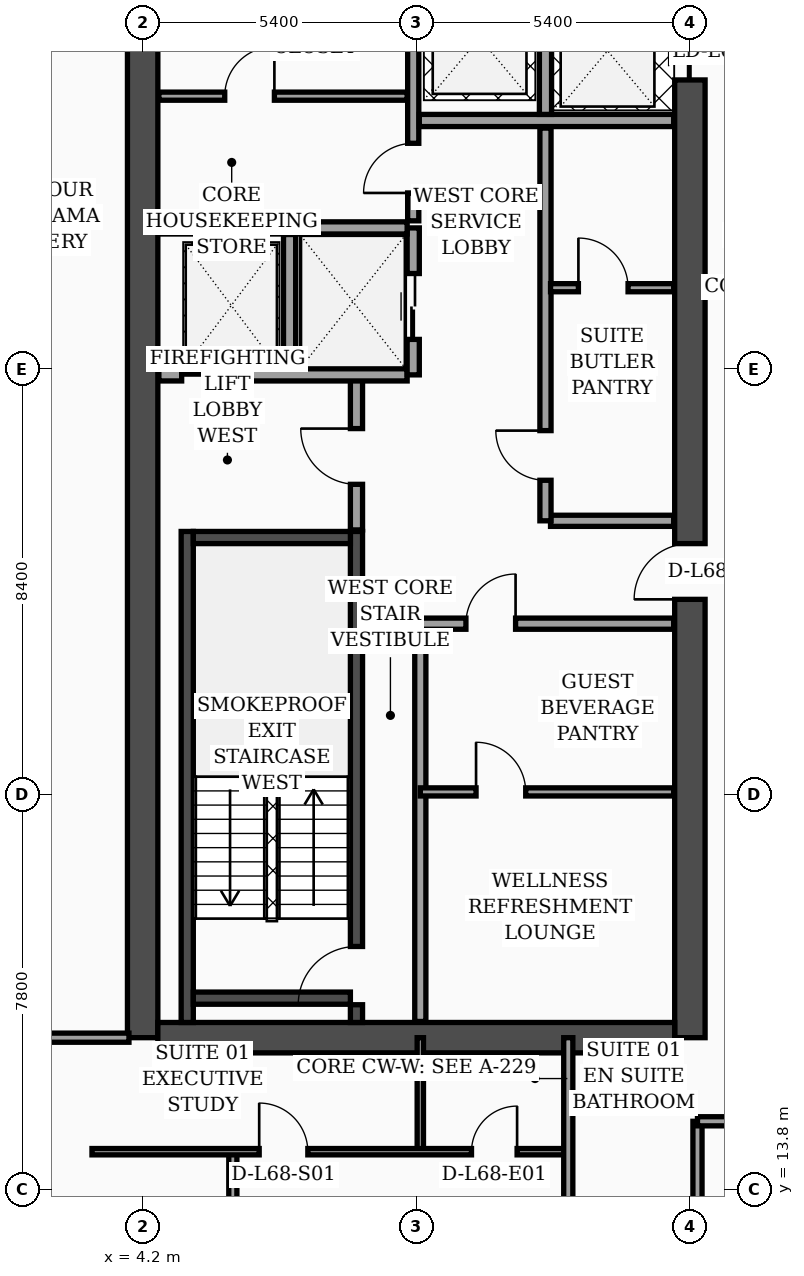
"""IFC4 building model, lengths in metres.
Left out: names, types, materials, properties, quantities, classifications, styles, units other than length and angle.
Written with IfcOpenShell. Run it as: python <this file> out.ifc"""

import sys

from ifc_helpers import new_model, si_unit, direction, frame, frame_2d, origin, place, context, subcontext, project, spatial, rectangle, extrude, element, fill, save


model = new_model("IFC4")
c1 = context("Model", 3, precision=1e-05, world=origin(), true_north=direction((0.0, 1.0)))
c2 = subcontext(c1, "Body", "Model", "MODEL_VIEW")
j1 = project(units=[si_unit("LENGTHUNIT", "METRE"), si_unit("PLANEANGLEUNIT", "RADIAN")], contexts=[c1])
p1 = place(None, origin())
s1 = spatial("IfcSite", under=j1, at=p1, CompositionType="ELEMENT")
p2 = place(p1, origin())
s2 = spatial("IfcBuilding", under=s1, at=p2, CompositionType="ELEMENT")
p3 = place(p2, frame((0.0, 0.0, 274.9)))
s3 = spatial("IfcBuildingStorey", under=s2, at=p3, CompositionType="ELEMENT", Elevation=274.9)
p4 = place(p3, frame((4.2, 16.8, 0.0), z_axis=(0.0, 0.0, 1.0), x_axis=(0.0, 1.0, 0.0)))
e1 = element("IfcWall", 1, at=p4, inside=s3, PredefinedType="SHEAR", context=c2, shape_type="SweptSolid", body=[
    extrude(rectangle(XDim=21.6, YDim=0.6, at=frame_2d((10.8, 0.0))), origin(), (0.0, 0.0, 1.0), 3.56),
])
p5 = place(p3, frame((15.0, 16.8, 0.0), z_axis=(0.0, 0.0, 1.0), x_axis=(0.0, 1.0, 0.0)))
e2 = element("IfcWall", 2, at=p5, inside=s3, PredefinedType="SHEAR", context=c2, shape_type="SweptSolid", body=[
    extrude(rectangle(XDim=21.6, YDim=0.6, at=frame_2d((10.8, 0.0))), origin(), (0.0, 0.0, 1.0), 3.56),
])
p6 = place(p5, frame((8.65, 0.0, 0.0)))
e3 = element("IfcOpeningElement", 3, at=p6, cuts=e2, PredefinedType="OPENING", context=c2, shape_type="SweptSolid", body=[
    extrude(rectangle(XDim=1.1, YDim=2.2, at=frame_2d((0.55, 1.1))), frame((0.0, 0.31, 0.0), z_axis=(0.0, -1.0, 0.0), x_axis=(1.0, 0.0, 0.0)), (0.0, 0.0, 1.0), 0.62),
])
p7 = place(p5, frame((18.9, 0.0, 0.0)))
e4 = element("IfcOpeningElement", 4, at=p7, cuts=e2, PredefinedType="OPENING", context=c2, shape_type="SweptSolid", body=[
    extrude(rectangle(XDim=1.1, YDim=2.2, at=frame_2d((0.55, 1.1))), frame((0.0, 0.31, 0.0), z_axis=(0.0, -1.0, 0.0), x_axis=(1.0, 0.0, 0.0)), (0.0, 0.0, 1.0), 0.62),
])
p8 = place(p3, frame((4.5, 16.8, 0.0), z_axis=(0.0, 0.0, 1.0), x_axis=(1.0, 0.0, 0.0)))
e5 = element("IfcWall", 5, at=p8, inside=s3, PredefinedType="SHEAR", context=c2, shape_type="SweptSolid", body=[
    extrude(rectangle(XDim=10.2, YDim=0.6, at=frame_2d((5.1, 0.0))), origin(), (0.0, 0.0, 1.0), 3.56),
])
p9 = place(p3, frame((5.08, 17.1, 0.0), z_axis=(0.0, 0.0, 1.0), x_axis=(0.0, 1.0, 0.0)))
e6 = element("IfcWall", 6, at=p9, inside=s3, PredefinedType="SOLIDWALL", context=c2, shape_type="SweptSolid", body=[
    extrude(rectangle(XDim=9.69, YDim=0.24, at=frame_2d((4.845, 0.0))), origin(), (0.0, 0.0, 1.0), 3.56),
])
p10 = place(p3, frame((8.42, 17.1, 0.0), z_axis=(0.0, 0.0, 1.0), x_axis=(0.0, 1.0, 0.0)))
e7 = element("IfcWall", 7, at=p10, inside=s3, PredefinedType="SOLIDWALL", context=c2, shape_type="SweptSolid", body=[
    extrude(rectangle(XDim=9.69, YDim=0.24, at=frame_2d((4.845, 0.0))), origin(), (0.0, 0.0, 1.0), 3.56),
])
p11 = place(p10, frame((0.35, 0.0, 0.0)))
e8 = element("IfcOpeningElement", 8, at=p11, cuts=e7, PredefinedType="OPENING", context=c2, shape_type="SweptSolid", body=[
    extrude(rectangle(XDim=1.15, YDim=2.2, at=frame_2d((0.575, 1.1))), frame((0.0, 0.13, 0.0), z_axis=(0.0, -1.0, 0.0), x_axis=(1.0, 0.0, 0.0)), (0.0, 0.0, 1.0), 0.26),
])
for number, where, z_axis, x_axis in (
    (9, (5.2, 17.58, 0.0), (0.0, 0.0, 1.0), (1.0, 0.0, 0.0)),
    (10, (5.2, 26.67, 0.0), (0.0, 0.0, 1.0), (1.0, 0.0, 0.0)),
):
    element("IfcWall", number, at=place(p3, frame(where, z_axis=z_axis, x_axis=x_axis)), inside=s3, PredefinedType="SOLIDWALL", context=c2, shape_type="SweptSolid", body=[
        extrude(rectangle(XDim=3.1, YDim=0.24, at=frame_2d((1.55, 0.0))), origin(), (0.0, 0.0, 1.0), 3.56),
    ])
p12 = place(p3, frame((8.42, 26.82, 0.0), z_axis=(0.0, 0.0, 1.0), x_axis=(0.0, 1.0, 0.0)))
e11 = element("IfcWall", 11, at=p12, inside=s3, PredefinedType="SOLIDWALL", context=c2, shape_type="SweptSolid", body=[
    extrude(rectangle(XDim=3.0, YDim=0.24, at=frame_2d((1.5, 0.0))), origin(), (0.0, 0.0, 1.0), 3.56),
])
p13 = place(p12, frame((0.9, 0.0, 0.0)))
e12 = element("IfcOpeningElement", 12, at=p13, cuts=e11, PredefinedType="OPENING", context=c2, shape_type="SweptSolid", body=[
    extrude(rectangle(XDim=1.1, YDim=2.2, at=frame_2d((0.55, 1.1))), frame((0.0, 0.13, 0.0), z_axis=(0.0, -1.0, 0.0), x_axis=(1.0, 0.0, 0.0)), (0.0, 0.0, 1.0), 0.26),
])
p14 = place(p3, frame((4.52, 29.88, 0.0), z_axis=(0.0, 0.0, 1.0), x_axis=(1.0, 0.0, 0.0)))
e13 = element("IfcWall", 13, at=p14, inside=s3, PredefinedType="SOLIDWALL", context=c2, shape_type="SweptSolid", body=[
    extrude(rectangle(XDim=4.9, YDim=0.24, at=frame_2d((2.45, 0.0))), origin(), (0.0, 0.0, 1.0), 3.56),
])
p15 = place(p14, frame((0.45, 0.0, 0.0)))
e14 = element("IfcOpeningElement", 14, at=p15, cuts=e13, PredefinedType="OPENING", context=c2, shape_type="SweptSolid", body=[
    extrude(rectangle(XDim=1.3, YDim=2.35, at=frame_2d((0.65, 1.175))), frame((0.0, 0.13, 0.0), z_axis=(0.0, -1.0, 0.0), x_axis=(1.0, 0.0, 0.0)), (0.0, 0.0, 1.0), 0.26),
])
p16 = place(p3, frame((7.1, 30.02, 0.0), z_axis=(0.0, 0.0, 1.0), x_axis=(0.0, 1.0, 0.0)))
e15 = element("IfcWall", 15, at=p16, inside=s3, PredefinedType="SOLIDWALL", context=c2, shape_type="SweptSolid", body=[
    extrude(rectangle(XDim=2.63, YDim=0.24, at=frame_2d((1.315, 0.0))), origin(), (0.0, 0.0, 1.0), 3.56),
])
p17 = place(p3, frame((9.54, 29.88, 0.0), z_axis=(0.0, 0.0, 1.0), x_axis=(0.0, 1.0, 0.0)))
e16 = element("IfcWall", 16, at=p17, inside=s3, PredefinedType="SOLIDWALL", context=c2, shape_type="SweptSolid", body=[
    extrude(rectangle(XDim=2.9, YDim=0.24, at=frame_2d((1.45, 0.0))), origin(), (0.0, 0.0, 1.0), 3.56),
])
p18 = place(p17, frame((0.7, 0.0, 0.0)))
e17 = element("IfcOpeningElement", 17, at=p18, cuts=e16, PredefinedType="OPENING", context=c2, shape_type="SweptSolid", body=[
    extrude(rectangle(XDim=1.3, YDim=2.35, at=frame_2d((0.65, 1.175))), frame((0.0, 0.13, 0.0), z_axis=(0.0, -1.0, 0.0), x_axis=(1.0, 0.0, 0.0)), (0.0, 0.0, 1.0), 0.26),
])
p19 = place(p3, frame((4.52, 32.78, 0.0), z_axis=(0.0, 0.0, 1.0), x_axis=(1.0, 0.0, 0.0)))
e18 = element("IfcWall", 18, at=p19, inside=s3, PredefinedType="SOLIDWALL", context=c2, shape_type="SweptSolid", body=[
    extrude(rectangle(XDim=4.9, YDim=0.24, at=frame_2d((2.45, 0.0))), origin(), (0.0, 0.0, 1.0), 3.19),
])
p20 = place(p3, frame((9.68, 17.12, 0.0), z_axis=(0.0, 0.0, 1.0), x_axis=(0.0, 1.0, 0.0)))
e19 = element("IfcWall", 19, at=p20, inside=s3, PredefinedType="SOLIDWALL", context=c2, shape_type="SweptSolid", body=[
    extrude(rectangle(XDim=7.88, YDim=0.22, at=frame_2d((3.94, 0.0))), origin(), (0.0, 0.0, 1.0), 3.56),
])
p21 = place(p3, frame((4.52, 35.38, 0.0), z_axis=(0.0, 0.0, 1.0), x_axis=(1.0, 0.0, 0.0)))
e20 = element("IfcWall", 20, at=p21, inside=s3, PredefinedType="PARTITIONING", context=c2, shape_type="SweptSolid", body=[
    extrude(rectangle(XDim=4.9, YDim=0.16, at=frame_2d((2.45, 0.0))), origin(), (0.0, 0.0, 1.0), 3.56),
])
p22 = place(p21, frame((1.3, 0.0, 0.0)))
e21 = element("IfcOpeningElement", 21, at=p22, cuts=e20, PredefinedType="OPENING", context=c2, shape_type="SweptSolid", body=[
    extrude(rectangle(XDim=0.98, YDim=2.15, at=frame_2d((0.49, 1.075))), frame((0.0, 0.09, 0.0), z_axis=(0.0, -1.0, 0.0), x_axis=(1.0, 0.0, 0.0)), (0.0, 0.0, 1.0), 0.18),
])
p23 = place(p3, frame((9.54, 32.92, 0.0), z_axis=(0.0, 0.0, 1.0), x_axis=(0.0, 1.0, 0.0)))
e22 = element("IfcWall", 22, at=p23, inside=s3, PredefinedType="SOLIDWALL", context=c2, shape_type="SweptSolid", body=[
    extrude(rectangle(XDim=5.16, YDim=0.22, at=frame_2d((2.58, 0.0))), origin(), (0.0, 0.0, 1.0), 3.56),
])
p24 = place(p23, frame((0.55, 0.0, 0.0)))
e23 = element("IfcOpeningElement", 23, at=p24, cuts=e22, PredefinedType="OPENING", context=c2, shape_type="SweptSolid", body=[
    extrude(rectangle(XDim=0.98, YDim=2.15, at=frame_2d((0.49, 1.075))), frame((0.0, 0.12, 0.0), z_axis=(0.0, -1.0, 0.0), x_axis=(1.0, 0.0, 0.0)), (0.0, 0.0, 1.0), 0.24),
])
p25 = place(p3, frame((9.68, 21.65, 0.0), z_axis=(0.0, 0.0, 1.0), x_axis=(1.0, 0.0, 0.0)))
e24 = element("IfcWall", 24, at=p25, inside=s3, PredefinedType="PARTITIONING", context=c2, shape_type="SweptSolid", body=[
    extrude(rectangle(XDim=5.0, YDim=0.16, at=frame_2d((2.5, 0.0))), origin(), (0.0, 0.0, 1.0), 3.09),
])
p26 = place(p25, frame((1.1, 0.0, 0.0)))
e25 = element("IfcOpeningElement", 25, at=p26, cuts=e24, PredefinedType="OPENING", context=c2, shape_type="SweptSolid", body=[
    extrude(rectangle(XDim=0.98, YDim=2.15, at=frame_2d((0.49, 1.075))), frame((0.0, 0.09, 0.0), z_axis=(0.0, -1.0, 0.0), x_axis=(1.0, 0.0, 0.0)), (0.0, 0.0, 1.0), 0.18),
])
p27 = place(p3, frame((9.68, 24.97, 0.0), z_axis=(0.0, 0.0, 1.0), x_axis=(1.0, 0.0, 0.0)))
e26 = element("IfcWall", 26, at=p27, inside=s3, PredefinedType="SOLIDWALL", context=c2, shape_type="SweptSolid", body=[
    extrude(rectangle(XDim=5.0, YDim=0.22, at=frame_2d((2.5, 0.0))), origin(), (0.0, 0.0, 1.0), 2.99),
])
p28 = place(p27, frame((0.9, 0.0, 0.0)))
e27 = element("IfcOpeningElement", 27, at=p28, cuts=e26, PredefinedType="OPENING", context=c2, shape_type="SweptSolid", body=[
    extrude(rectangle(XDim=0.98, YDim=2.15, at=frame_2d((0.49, 1.075))), frame((0.0, 0.12, 0.0), z_axis=(0.0, -1.0, 0.0), x_axis=(1.0, 0.0, 0.0)), (0.0, 0.0, 1.0), 0.24),
])
p29 = place(p3, frame((12.25, 27.0, 0.0), z_axis=(0.0, 0.0, 1.0), x_axis=(1.0, 0.0, 0.0)))
e28 = element("IfcWall", 28, at=p29, inside=s3, PredefinedType="SOLIDWALL", context=c2, shape_type="SweptSolid", body=[
    extrude(rectangle(XDim=2.43, YDim=0.22, at=frame_2d((1.215, 0.0))), origin(), (0.0, 0.0, 1.0), 3.56),
])
p30 = place(p3, frame((12.15, 27.0, 0.0), z_axis=(0.0, 0.0, 1.0), x_axis=(0.0, 1.0, 0.0)))
e29 = element("IfcWall", 29, at=p30, inside=s3, PredefinedType="SOLIDWALL", context=c2, shape_type="SweptSolid", body=[
    extrude(rectangle(XDim=7.75, YDim=0.22, at=frame_2d((3.875, 0.0))), origin(), (0.0, 0.0, 1.0), 3.56),
])
p31 = place(p30, frame((0.8, 0.0, 0.0)))
e30 = element("IfcOpeningElement", 30, at=p31, cuts=e29, PredefinedType="OPENING", context=c2, shape_type="SweptSolid", body=[
    extrude(rectangle(XDim=0.98, YDim=2.15, at=frame_2d((0.49, 1.075))), frame((0.0, 0.12, 0.0), z_axis=(0.0, -1.0, 0.0), x_axis=(1.0, 0.0, 0.0)), (0.0, 0.0, 1.0), 0.24),
])
p32 = place(p3, frame((12.25, 31.6, 0.0), z_axis=(0.0, 0.0, 1.0), x_axis=(1.0, 0.0, 0.0)))
e31 = element("IfcWall", 31, at=p32, inside=s3, PredefinedType="PARTITIONING", context=c2, shape_type="SweptSolid", body=[
    extrude(rectangle(XDim=2.43, YDim=0.16, at=frame_2d((1.215, 0.0))), origin(), (0.0, 0.0, 1.0), 3.14),
])
p33 = place(p32, frame((0.55, 0.0, 0.0)))
e32 = element("IfcOpeningElement", 32, at=p33, cuts=e31, PredefinedType="OPENING", context=c2, shape_type="SweptSolid", body=[
    extrude(rectangle(XDim=0.98, YDim=2.15, at=frame_2d((0.49, 1.075))), frame((0.0, 0.09, 0.0), z_axis=(0.0, -1.0, 0.0), x_axis=(1.0, 0.0, 0.0)), (0.0, 0.0, 1.0), 0.18),
])
p34 = place(p3, frame((9.66, 34.9, 0.0), z_axis=(0.0, 0.0, 1.0), x_axis=(1.0, 0.0, 0.0)))
e33 = element("IfcWall", 33, at=p34, inside=s3, PredefinedType="SOLIDWALL", context=c2, shape_type="SweptSolid", body=[
    extrude(rectangle(XDim=5.02, YDim=0.24, at=frame_2d((2.51, 0.0))), origin(), (0.0, 0.0, 1.0), 3.56),
])
p35 = place(p3, frame((12.15, 35.02, 0.0), z_axis=(0.0, 0.0, 1.0), x_axis=(0.0, 1.0, 0.0)))
e34 = element("IfcWall", 34, at=p35, inside=s3, PredefinedType="SOLIDWALL", context=c2, shape_type="SweptSolid", body=[
    extrude(rectangle(XDim=3.06, YDim=0.24, at=frame_2d((1.53, 0.0))), origin(), (0.0, 0.0, 1.0), 3.56),
])
p36 = place(p3, frame((0.08, 16.8, 0.0), z_axis=(0.0, 0.0, 1.0), x_axis=(1.0, 0.0, 0.0)))
e35 = element("IfcWall", 35, at=p36, inside=s3, PredefinedType="PARTITIONING", context=c2, shape_type="SweptSolid", body=[
    extrude(rectangle(XDim=3.85, YDim=0.18, at=frame_2d((1.925, 0.0))), origin(), (0.0, 0.0, 1.0), 2.99),
])
p37 = place(p3, frame((9.68, 14.55, 0.0), z_axis=(0.0, 0.0, 1.0), x_axis=(0.0, 1.0, 0.0)))
e36 = element("IfcWall", 36, at=p37, inside=s3, PredefinedType="PARTITIONING", context=c2, shape_type="SweptSolid", body=[
    extrude(rectangle(XDim=2.25, YDim=0.125, at=frame_2d((1.125, 0.0))), origin(), (0.0, 0.0, 1.0), 3.56),
])
p38 = place(p3, frame((5.98, 2.44, 0.0), z_axis=(0.0, 0.0, 1.0), x_axis=(0.0, 1.0, 0.0)))
e37 = element("IfcWall", 37, at=p38, inside=s3, PredefinedType="PARTITIONING", context=c2, shape_type="SweptSolid", body=[
    extrude(rectangle(XDim=12.11, YDim=0.16, at=frame_2d((6.055, 0.0))), origin(), (0.0, 0.0, 1.0), 3.09),
])
p39 = place(p38, frame((5.58, 0.0, 0.0)))
e38 = element("IfcOpeningElement", 38, at=p39, cuts=e37, PredefinedType="OPENING", context=c2, shape_type="SweptSolid", body=[
    extrude(rectangle(XDim=0.96, YDim=2.2, at=frame_2d((0.48, 1.1))), frame((0.0, 0.09, 0.0), z_axis=(0.0, -1.0, 0.0), x_axis=(1.0, 0.0, 0.0)), (0.0, 0.0, 1.0), 0.18),
])
p40 = place(p3, frame((3.2, 14.55, 0.0), z_axis=(0.0, 0.0, 1.0), x_axis=(1.0, 0.0, 0.0)))
e39 = element("IfcWall", 39, at=p40, inside=s3, PredefinedType="PARTITIONING", context=c2, shape_type="SweptSolid", body=[
    extrude(rectangle(XDim=9.4, YDim=0.125, at=frame_2d((4.7, 0.0))), origin(), (0.0, 0.0, 1.0), 2.99),
])
p41 = place(p40, frame((3.3, 0.0, 0.0)))
e40 = element("IfcOpeningElement", 40, at=p41, cuts=e39, PredefinedType="OPENING", context=c2, shape_type="SweptSolid", body=[
    extrude(rectangle(XDim=0.96, YDim=2.2, at=frame_2d((0.48, 1.1))), frame((0.0, 0.073, 0.0), z_axis=(0.0, -1.0, 0.0), x_axis=(1.0, 0.0, 0.0)), (0.0, 0.0, 1.0), 0.145),
])
p42 = place(p40, frame((7.49, 0.0, 0.0)))
e41 = element("IfcOpeningElement", 41, at=p42, cuts=e39, PredefinedType="OPENING", context=c2, shape_type="SweptSolid", body=[
    extrude(rectangle(XDim=0.9, YDim=2.15, at=frame_2d((0.45, 1.075))), frame((0.0, 0.073, 0.0), z_axis=(0.0, -1.0, 0.0), x_axis=(1.0, 0.0, 0.0)), (0.0, 0.0, 1.0), 0.145),
])
p43 = place(p3, frame((12.6, 2.44, 0.0), z_axis=(0.0, 0.0, 1.0), x_axis=(0.0, 1.0, 0.0)))
e42 = element("IfcWall", 42, at=p43, inside=s3, PredefinedType="PARTITIONING", context=c2, shape_type="SweptSolid", body=[
    extrude(rectangle(XDim=14.36, YDim=0.18, at=frame_2d((7.18, 0.0))), origin(), (0.0, 0.0, 1.0), 2.99),
])
p44 = place(p43, frame((3.01, 0.0, 0.0)))
e43 = element("IfcOpeningElement", 43, at=p44, cuts=e42, PredefinedType="OPENING", context=c2, shape_type="SweptSolid", body=[
    extrude(rectangle(XDim=1.02, YDim=2.2, at=frame_2d((0.51, 1.1))), frame((0.0, 0.1, 0.0), z_axis=(0.0, -1.0, 0.0), x_axis=(1.0, 0.0, 0.0)), (0.0, 0.0, 1.0), 0.2),
])
p45 = place(p3, frame((15.15, 2.44, 0.0), z_axis=(0.0, 0.0, 1.0), x_axis=(0.0, 1.0, 0.0)))
e44 = element("IfcWall", 44, at=p45, inside=s3, PredefinedType="PARTITIONING", context=c2, shape_type="SweptSolid", body=[
    extrude(rectangle(XDim=12.71, YDim=0.18, at=frame_2d((6.355, 0.0))), origin(), (0.0, 0.0, 1.0), 3.09),
])
p46 = place(p3, frame((15.15, 15.15, 0.0), z_axis=(0.0, 0.0, 1.0), x_axis=(1.0, 0.0, 0.0)))
e45 = element("IfcWall", 45, at=p46, inside=s3, PredefinedType="PARTITIONING", context=c2, shape_type="SweptSolid", body=[
    extrude(rectangle(XDim=6.45, YDim=0.18, at=frame_2d((3.225, 0.0))), origin(), (0.0, 0.0, 1.0), 2.59),
])
p47 = place(p46, frame((1.74, 0.0, 0.0)))
e46 = element("IfcOpeningElement", 46, at=p47, cuts=e45, PredefinedType="OPENING", context=c2, shape_type="SweptSolid", body=[
    extrude(rectangle(XDim=1.02, YDim=2.2, at=frame_2d((0.51, 1.1))), frame((0.0, 0.1, 0.0), z_axis=(0.0, -1.0, 0.0), x_axis=(1.0, 0.0, 0.0)), (0.0, 0.0, 1.0), 0.2),
])
p48 = place(p13, origin())
e47 = element("IfcDoor", 47, at=p48, inside=s3, OperationType="SINGLE_SWING_RIGHT", PredefinedType="DOOR", context=c2, shape_type="SweptSolid", body=[
    extrude(rectangle(XDim=1.1, YDim=2.2, at=frame_2d((0.55, 1.1))), frame((0.0, 0.025, 0.0), z_axis=(0.0, -1.0, 0.0), x_axis=(1.0, 0.0, 0.0)), (0.0, 0.0, 1.0), 0.05),
])
fill(e12, e47)
p49 = place(p15, origin())
e48 = element("IfcDoor", 48, at=p49, inside=s3, OperationType="DOUBLE_DOOR_SLIDING", PredefinedType="DOOR", context=c2, shape_type="SweptSolid", body=[
    extrude(rectangle(XDim=1.3, YDim=2.35, at=frame_2d((0.65, 1.175))), frame((0.0, 0.025, 0.0), z_axis=(0.0, -1.0, 0.0), x_axis=(1.0, 0.0, 0.0)), (0.0, 0.0, 1.0), 0.05),
])
fill(e14, e48)
p50 = place(p18, origin())
e49 = element("IfcDoor", 49, at=p50, inside=s3, OperationType="DOUBLE_DOOR_SLIDING", PredefinedType="DOOR", context=c2, shape_type="SweptSolid", body=[
    extrude(rectangle(XDim=1.3, YDim=2.35, at=frame_2d((0.65, 1.175))), frame((0.0, 0.025, 0.0), z_axis=(0.0, -1.0, 0.0), x_axis=(1.0, 0.0, 0.0)), (0.0, 0.0, 1.0), 0.05),
])
fill(e17, e49)
p51 = place(p22, origin())
e50 = element("IfcDoor", 50, at=p51, inside=s3, OperationType="SINGLE_SWING_RIGHT", PredefinedType="DOOR", context=c2, shape_type="SweptSolid", body=[
    extrude(rectangle(XDim=0.98, YDim=2.15, at=frame_2d((0.49, 1.075))), frame((0.0, 0.025, 0.0), z_axis=(0.0, -1.0, 0.0), x_axis=(1.0, 0.0, 0.0)), (0.0, 0.0, 1.0), 0.05),
])
fill(e21, e50)
p52 = place(p24, origin())
e51 = element("IfcDoor", 51, at=p52, inside=s3, OperationType="SINGLE_SWING_LEFT", PredefinedType="DOOR", context=c2, shape_type="SweptSolid", body=[
    extrude(rectangle(XDim=0.98, YDim=2.15, at=frame_2d((0.49, 1.075))), frame((0.0, 0.025, 0.0), z_axis=(0.0, -1.0, 0.0), x_axis=(1.0, 0.0, 0.0)), (0.0, 0.0, 1.0), 0.05),
])
fill(e23, e51)
p53 = place(p26, origin())
e52 = element("IfcDoor", 52, at=p53, inside=s3, OperationType="SINGLE_SWING_LEFT", PredefinedType="DOOR", context=c2, shape_type="SweptSolid", body=[
    extrude(rectangle(XDim=0.98, YDim=2.15, at=frame_2d((0.49, 1.075))), frame((0.0, 0.025, 0.0), z_axis=(0.0, -1.0, 0.0), x_axis=(1.0, 0.0, 0.0)), (0.0, 0.0, 1.0), 0.05),
])
fill(e25, e52)
p54 = place(p28, origin())
e53 = element("IfcDoor", 53, at=p54, inside=s3, OperationType="SINGLE_SWING_RIGHT", PredefinedType="DOOR", context=c2, shape_type="SweptSolid", body=[
    extrude(rectangle(XDim=0.98, YDim=2.15, at=frame_2d((0.49, 1.075))), frame((0.0, 0.025, 0.0), z_axis=(0.0, -1.0, 0.0), x_axis=(1.0, 0.0, 0.0)), (0.0, 0.0, 1.0), 0.05),
])
fill(e27, e53)
p55 = place(p31, origin())
e54 = element("IfcDoor", 54, at=p55, inside=s3, OperationType="SINGLE_SWING_RIGHT", PredefinedType="DOOR", context=c2, shape_type="SweptSolid", body=[
    extrude(rectangle(XDim=0.98, YDim=2.15, at=frame_2d((0.49, 1.075))), frame((0.0, 0.025, 0.0), z_axis=(0.0, -1.0, 0.0), x_axis=(1.0, 0.0, 0.0)), (0.0, 0.0, 1.0), 0.05),
])
fill(e30, e54)
p56 = place(p33, origin())
e55 = element("IfcDoor", 55, at=p56, inside=s3, OperationType="SINGLE_SWING_LEFT", PredefinedType="DOOR", context=c2, shape_type="SweptSolid", body=[
    extrude(rectangle(XDim=0.98, YDim=2.15, at=frame_2d((0.49, 1.075))), frame((0.0, 0.025, 0.0), z_axis=(0.0, -1.0, 0.0), x_axis=(1.0, 0.0, 0.0)), (0.0, 0.0, 1.0), 0.05),
])
fill(e32, e55)
p57 = place(p41, origin())
e56 = element("IfcDoor", 56, at=p57, inside=s3, OperationType="SINGLE_SWING_LEFT", PredefinedType="DOOR", context=c2, shape_type="SweptSolid", body=[
    extrude(rectangle(XDim=0.96, YDim=2.2, at=frame_2d((0.48, 1.1))), frame((0.0, 0.025, 0.0), z_axis=(0.0, -1.0, 0.0), x_axis=(1.0, 0.0, 0.0)), (0.0, 0.0, 1.0), 0.05),
])
fill(e40, e56)
p58 = place(p42, origin())
e57 = element("IfcDoor", 57, at=p58, inside=s3, OperationType="SINGLE_SWING_RIGHT", PredefinedType="DOOR", context=c2, shape_type="SweptSolid", body=[
    extrude(rectangle(XDim=0.9, YDim=2.15, at=frame_2d((0.45, 1.075))), frame((0.0, 0.025, 0.0), z_axis=(0.0, -1.0, 0.0), x_axis=(1.0, 0.0, 0.0)), (0.0, 0.0, 1.0), 0.05),
])
fill(e41, e57)
p59 = place(p11, origin())
e58 = element("IfcDoor", 58, at=p59, inside=s3, OperationType="SINGLE_SWING_LEFT", PredefinedType="DOOR", context=c2, shape_type="SweptSolid", body=[
    extrude(rectangle(XDim=1.15, YDim=2.2, at=frame_2d((0.575, 1.1))), frame((0.0, 0.025, 0.0), z_axis=(0.0, -1.0, 0.0), x_axis=(1.0, 0.0, 0.0)), (0.0, 0.0, 1.0), 0.05),
])
fill(e8, e58)
p60 = place(p6, origin())
e59 = element("IfcDoor", 59, at=p60, inside=s3, OperationType="SINGLE_SWING_LEFT", PredefinedType="DOOR", context=c2, shape_type="SweptSolid", body=[
    extrude(rectangle(XDim=1.1, YDim=2.2, at=frame_2d((0.55, 1.1))), frame((0.0, 0.025, 0.0), z_axis=(0.0, -1.0, 0.0), x_axis=(1.0, 0.0, 0.0)), (0.0, 0.0, 1.0), 0.05),
])
fill(e3, e59)
p61 = place(p7, origin())
e60 = element("IfcDoor", 60, at=p61, inside=s3, OperationType="DOUBLE_DOOR_SLIDING", PredefinedType="DOOR", context=c2, shape_type="SweptSolid", body=[
    extrude(rectangle(XDim=1.1, YDim=2.2, at=frame_2d((0.55, 1.1))), frame((0.0, 0.025, 0.0), z_axis=(0.0, -1.0, 0.0), x_axis=(1.0, 0.0, 0.0)), (0.0, 0.0, 1.0), 0.05),
])
fill(e4, e60)
save(model, sys.argv[1])
